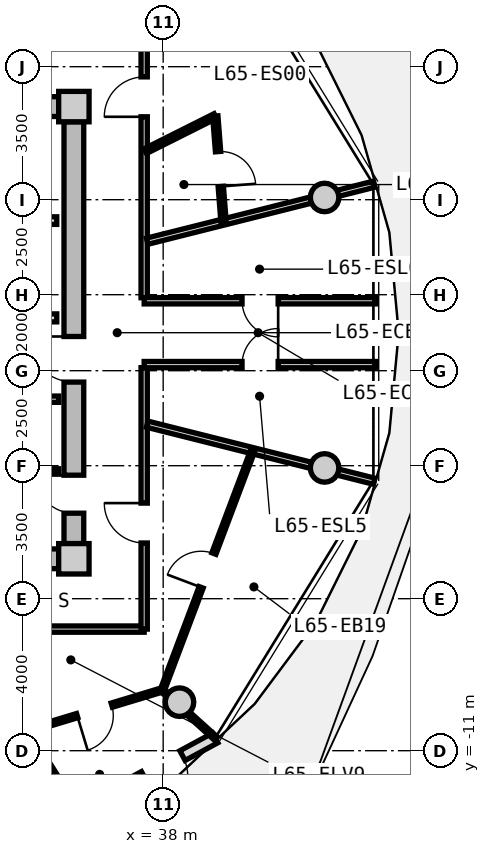
"""IFC4 building model, lengths in metres.
Left out: names, types, materials, properties, quantities, classifications, styles, units other than length and angle.
Written with IfcOpenShell. Run it as: python <this file> out.ifc"""

import sys

from ifc_helpers import new_model, si_unit, direction, frame, frame_2d, origin, origin_2d, place, context, subcontext, project, spatial, rectangle, circle, extrude, source, transform, mapped, element, fill, save


model = new_model("IFC4")
c1 = context("Model", 3, precision=1e-05, world=origin(), true_north=direction((0.0, 1.0)))
c2 = subcontext(c1, "Body", "Model", "MODEL_VIEW")
j1 = project(units=[si_unit("LENGTHUNIT", "METRE"), si_unit("PLANEANGLEUNIT", "RADIAN")], contexts=[c1])
p1 = place(None, origin())
s1 = spatial("IfcSite", under=j1, at=p1, CompositionType="ELEMENT")
p2 = place(p1, origin())
s2 = spatial("IfcBuilding", under=s1, at=p2, CompositionType="ELEMENT")
p3 = place(p2, frame((0.0, 0.0, 210.85)))
s3 = spatial("IfcBuildingStorey", under=s2, at=p3, CompositionType="ELEMENT", Elevation=210.85)
m1 = source(origin(), c2, "Body", "SweptSolid", [
    extrude(rectangle(XDim=0.8, YDim=0.8, at=origin_2d()), origin(), (0.0, 0.0, 1.0), 3.05),
])
for number, where, z_axis, x_axis in (
    (1, (35.65, -5.95, 0.0), (0.0, 0.0, 1.0), (1.0, 0.0, 0.0)),
    (2, (35.65, 5.95, 0.0), (0.0, 0.0, 1.0), (1.0, 0.0, 0.0)),
):
    element("IfcColumn", number, at=place(p3, frame(where, z_axis=z_axis, x_axis=x_axis)), inside=s3, PredefinedType="COLUMN", context=c2, shape_type="MappedRepresentation", body=[
        mapped(m1, transform((0.0, 0.0, 0.0), x_axis=(1.0, 0.0, 0.0), y_axis=(0.0, 1.0, 0.0), z_axis=(0.0, 0.0, 1.0), scale=1.0)),
    ])
m2 = source(origin(), c2, "Body", "SweptSolid", [
    extrude(rectangle(XDim=14.5, YDim=0.52, at=frame_2d((7.25, 0.0))), origin(), (0.0, 0.0, 1.0), 2.76),
])
for number, where, z_axis, x_axis in (
    (3, (20.75, 5.95, 0.0), (0.0, 0.0, 1.0), (1.0, 0.0, 0.0)),
    (4, (35.25, -5.95, 0.0), (0.0, 0.0, 1.0), (-1.0, 0.0, 0.0)),
):
    element("IfcWall", number, at=place(p3, frame(where, z_axis=z_axis, x_axis=x_axis)), inside=s3, PredefinedType="SHEAR", context=c2, shape_type="MappedRepresentation", body=[
        mapped(m2, transform((0.0, 0.0, 0.0), x_axis=(1.0, 0.0, 0.0), y_axis=(0.0, 1.0, 0.0), z_axis=(0.0, 0.0, 1.0), scale=1.0)),
    ])
m3 = source(origin(), c2, "Body", "SweptSolid", [
    extrude(rectangle(XDim=11.1, YDim=0.52, at=frame_2d((5.55, 0.0))), origin(), (0.0, 0.0, 1.0), 2.76),
])
p4 = place(p3, frame((35.65, 5.55, 0.0), z_axis=(0.0, 0.0, 1.0), x_axis=(0.0, -1.0, 0.0)))
e5 = element("IfcWall", 5, at=p4, inside=s3, PredefinedType="SHEAR", context=c2, shape_type="MappedRepresentation", body=[
    mapped(m3, transform((0.0, 0.0, 0.0), x_axis=(1.0, 0.0, 0.0), y_axis=(0.0, 1.0, 0.0), z_axis=(0.0, 0.0, 1.0), scale=1.0)),
])
p5 = place(p4, frame((5.65, 0.0, 0.0)))
e6 = element("IfcOpeningElement", 6, at=p5, cuts=e5, PredefinedType="OPENING", context=c2, shape_type="SweptSolid", body=[
    extrude(rectangle(XDim=1.2, YDim=2.15, at=frame_2d((0.6, 1.075))), frame((0.0, 0.27, 0.0), z_axis=(0.0, -1.0, 0.0), x_axis=(1.0, 0.0, 0.0)), (0.0, 0.0, 1.0), 0.54),
])
p6 = place(p4, frame((9.3, 0.0, 0.0)))
e7 = element("IfcOpeningElement", 7, at=p6, cuts=e5, PredefinedType="OPENING", context=c2, shape_type="SweptSolid", body=[
    extrude(rectangle(XDim=1.0, YDim=2.1, at=frame_2d((0.5, 1.05))), frame((0.0, 0.27, 0.0), z_axis=(0.0, -1.0, 0.0), x_axis=(1.0, 0.0, 0.0)), (0.0, 0.0, 1.0), 0.54),
])
m4 = source(origin(), c2, "Body", "SweptSolid", [
    extrude(circle(Radius=0.375, at=origin_2d()), origin(), (0.0, 0.0, 1.0), 3.05),
])
for number, where, z_axis, x_axis in (
    (8, (42.247, 3.559, 0.0), (0.0, 0.0, 1.0), (1.0, 0.0, 0.0)),
    (9, (38.43, -9.723, 0.0), (0.0, 0.0, 1.0), (1.0, 0.0, 0.0)),
    (10, (42.247, -3.559, 0.0), (0.0, 0.0, 1.0), (1.0, 0.0, 0.0)),
):
    element("IfcColumn", number, at=place(p3, frame(where, z_axis=z_axis, x_axis=x_axis)), inside=s3, PredefinedType="COLUMN", context=c2, shape_type="MappedRepresentation", body=[
        mapped(m4, transform((0.0, 0.0, 0.0), x_axis=(1.0, 0.0, 0.0), y_axis=(0.0, 1.0, 0.0), z_axis=(0.0, 0.0, 1.0), scale=1.0)),
    ])
m5 = source(origin(), c2, "Body", "SweptSolid", [
    extrude(rectangle(XDim=8.197, YDim=0.29, at=frame_2d((4.099, 0.0))), origin(), (0.0, 0.0, 1.0), 2.76),
])
p7 = place(p3, frame((39.37, -10.663, 0.0), z_axis=(0.0, 0.0, 1.0), x_axis=(-0.879369910001, -0.476139224791, 0.0)))
e11 = element("IfcWall", 11, at=p7, inside=s3, PredefinedType="SOLIDWALL", context=c2, shape_type="MappedRepresentation", body=[
    mapped(m5, transform((0.0, 0.0, 0.0), x_axis=(1.0, 0.0, 0.0), y_axis=(0.0, 1.0, 0.0), z_axis=(0.0, 0.0, 1.0), scale=1.0)),
])
p8 = place(p7, frame((0.98, 0.0, 0.0)))
e12 = element("IfcOpeningElement", 12, at=p8, cuts=e11, PredefinedType="OPENING", context=c2, shape_type="SweptSolid", body=[
    extrude(rectangle(XDim=1.15, YDim=2.25, at=frame_2d((0.575, 1.125))), frame((0.0, 0.155, 0.0), z_axis=(0.0, -1.0, 0.0), x_axis=(1.0, 0.0, 0.0)), (0.0, 0.0, 1.0), 0.31),
])
p9 = place(p7, frame((4.629, 0.0, 0.85)))
e13 = element("IfcOpeningElement", 13, at=p9, cuts=e11, PredefinedType="OPENING", context=c2, shape_type="SweptSolid", body=[
    extrude(rectangle(XDim=1.2, YDim=1.5, at=frame_2d((0.6, 0.75))), frame((0.0, 0.155, 0.0), z_axis=(0.0, -1.0, 0.0), x_axis=(1.0, 0.0, 0.0)), (0.0, 0.0, 1.0), 0.31),
])
m6 = source(origin(), c2, "Body", "SweptSolid", [
    extrude(rectangle(XDim=3.2, YDim=0.2, at=frame_2d((1.6, 0.0))), origin(), (0.0, 0.0, 1.0), 2.745),
])
p10 = place(p3, frame((32.0, 2.95, 0.0), z_axis=(0.0, 0.0, 1.0), x_axis=(1.0, 0.0, 0.0)))
e14 = element("IfcWall", 14, at=p10, inside=s3, PredefinedType="PARTITIONING", context=c2, shape_type="MappedRepresentation", body=[
    mapped(m6, transform((0.0, 0.0, 0.0), x_axis=(1.0, 0.0, 0.0), y_axis=(0.0, 1.0, 0.0), z_axis=(0.0, 0.0, 1.0), scale=1.0)),
])
m7 = source(origin(), c2, "Body", "SweptSolid", [
    extrude(rectangle(XDim=6.66, YDim=0.21, at=frame_2d((3.33, 0.0))), origin(), (0.0, 0.0, 1.0), 2.745),
])
p11 = place(p3, frame((28.54, 0.39, 0.0), z_axis=(0.0, 0.0, 1.0), x_axis=(1.0, 0.0, 0.0)))
e15 = element("IfcWall", 15, at=p11, inside=s3, PredefinedType="PARTITIONING", context=c2, shape_type="MappedRepresentation", body=[
    mapped(m7, transform((0.0, 0.0, 0.0), x_axis=(1.0, 0.0, 0.0), y_axis=(0.0, 1.0, 0.0), z_axis=(0.0, 0.0, 1.0), scale=1.0)),
])
p12 = place(p11, frame((1.0, 0.0, 0.0)))
e16 = element("IfcOpeningElement", 16, at=p12, cuts=e15, PredefinedType="OPENING", context=c2, shape_type="SweptSolid", body=[
    extrude(rectangle(XDim=1.2, YDim=2.15, at=frame_2d((0.6, 1.075))), frame((0.0, 0.115, 0.0), z_axis=(0.0, -1.0, 0.0), x_axis=(1.0, 0.0, 0.0)), (0.0, 0.0, 1.0), 0.23),
])
m8 = source(origin(), c2, "Body", "SweptSolid", [
    extrude(rectangle(XDim=2.7, YDim=0.165, at=frame_2d((1.35, 0.0))), origin(), (0.0, 0.0, 1.0), 2.745),
])
p13 = place(p3, frame((32.55, -1.75, 0.0), z_axis=(0.0, 0.0, 1.0), x_axis=(1.0, 0.0, 0.0)))
e17 = element("IfcWall", 17, at=p13, inside=s3, PredefinedType="PARTITIONING", context=c2, shape_type="MappedRepresentation", body=[
    mapped(m8, transform((0.0, 0.0, 0.0), x_axis=(1.0, 0.0, 0.0), y_axis=(0.0, 1.0, 0.0), z_axis=(0.0, 0.0, 1.0), scale=1.0)),
])
p14 = place(p13, frame((0.85, 0.0, 0.0)))
e18 = element("IfcOpeningElement", 18, at=p14, cuts=e17, PredefinedType="OPENING", context=c2, shape_type="SweptSolid", body=[
    extrude(rectangle(XDim=0.925, YDim=2.1, at=frame_2d((0.462, 1.05))), frame((0.0, 0.093, 0.0), z_axis=(0.0, -1.0, 0.0), x_axis=(1.0, 0.0, 0.0)), (0.0, 0.0, 1.0), 0.185),
])
m9 = source(origin(), c2, "Body", "SweptSolid", [
    extrude(rectangle(XDim=2.7, YDim=0.14, at=frame_2d((1.35, 0.0))), origin(), (0.0, 0.0, 1.0), 2.745),
])
p15 = place(p3, frame((32.55, -3.65, 0.0), z_axis=(0.0, 0.0, 1.0), x_axis=(1.0, 0.0, 0.0)))
e19 = element("IfcWall", 19, at=p15, inside=s3, PredefinedType="PARTITIONING", context=c2, shape_type="MappedRepresentation", body=[
    mapped(m9, transform((0.0, 0.0, 0.0), x_axis=(1.0, 0.0, 0.0), y_axis=(0.0, 1.0, 0.0), z_axis=(0.0, 0.0, 1.0), scale=1.0)),
])
m10 = source(origin(), c2, "Body", "SweptSolid", [
    extrude(rectangle(XDim=19.0, YDim=0.165, at=frame_2d((9.5, 0.0))), origin(), (0.0, 0.0, 1.0), 2.745),
])
p16 = place(p3, frame((37.5, -7.8, 0.0), z_axis=(0.0, 0.0, 1.0), x_axis=(-1.0, 0.0, 0.0)))
e20 = element("IfcWall", 20, at=p16, inside=s3, PredefinedType="PARTITIONING", context=c2, shape_type="MappedRepresentation", body=[
    mapped(m10, transform((0.0, 0.0, 0.0), x_axis=(1.0, 0.0, 0.0), y_axis=(0.0, 1.0, 0.0), z_axis=(0.0, 0.0, 1.0), scale=1.0)),
])
p17 = place(p16, frame((12.473, 0.0, 0.0)))
e21 = element("IfcOpeningElement", 21, at=p17, cuts=e20, PredefinedType="OPENING", context=c2, shape_type="SweptSolid", body=[
    extrude(rectangle(XDim=1.05, YDim=2.15, at=frame_2d((0.525, 1.075))), frame((0.0, 0.093, 0.0), z_axis=(0.0, -1.0, 0.0), x_axis=(1.0, 0.0, 0.0)), (0.0, 0.0, 1.0), 0.185),
])
m11 = source(origin(), c2, "Body", "SweptSolid", [
    extrude(rectangle(XDim=6.88, YDim=0.165, at=frame_2d((3.44, 0.0))), origin(), (0.0, 0.0, 1.0), 2.745),
])
p18 = place(p3, frame((37.5, 7.8, 0.0), z_axis=(0.0, 0.0, 1.0), x_axis=(0.0, -1.0, 0.0)))
e22 = element("IfcWall", 22, at=p18, inside=s3, PredefinedType="PARTITIONING", context=c2, shape_type="MappedRepresentation", body=[
    mapped(m11, transform((0.0, 0.0, 0.0), x_axis=(1.0, 0.0, 0.0), y_axis=(0.0, 1.0, 0.0), z_axis=(0.0, 0.0, 1.0), scale=1.0)),
])
p19 = place(p18, frame((1.068, 0.0, 0.0)))
e23 = element("IfcOpeningElement", 23, at=p19, cuts=e22, PredefinedType="OPENING", context=c2, shape_type="SweptSolid", body=[
    extrude(rectangle(XDim=1.05, YDim=2.15, at=frame_2d((0.525, 1.075))), frame((0.0, 0.093, 0.0), z_axis=(0.0, -1.0, 0.0), x_axis=(1.0, 0.0, 0.0)), (0.0, 0.0, 1.0), 0.185),
])
p20 = place(p3, frame((37.5, -0.92, 0.0), z_axis=(0.0, 0.0, 1.0), x_axis=(0.0, -1.0, 0.0)))
e24 = element("IfcWall", 24, at=p20, inside=s3, PredefinedType="PARTITIONING", context=c2, shape_type="MappedRepresentation", body=[
    mapped(m11, transform((0.0, 0.0, 0.0), x_axis=(1.0, 0.0, 0.0), y_axis=(0.0, 1.0, 0.0), z_axis=(0.0, 0.0, 1.0), scale=1.0)),
])
p21 = place(p20, frame((3.564, 0.0, 0.0)))
e25 = element("IfcOpeningElement", 25, at=p21, cuts=e24, PredefinedType="OPENING", context=c2, shape_type="SweptSolid", body=[
    extrude(rectangle(XDim=1.05, YDim=2.15, at=frame_2d((0.525, 1.075))), frame((0.0, 0.093, 0.0), z_axis=(0.0, -1.0, 0.0), x_axis=(1.0, 0.0, 0.0)), (0.0, 0.0, 1.0), 0.185),
])
m12 = source(origin(), c2, "Body", "SweptSolid", [
    extrude(rectangle(XDim=6.157, YDim=0.165, at=frame_2d((3.079, 0.0))), origin(), (0.0, 0.0, 1.0), 2.345),
])
for number, where, z_axis, x_axis in (
    (26, (37.58, -2.407, 0.0), (0.0, 0.0, 1.0), (0.97, -0.244, 0.0)),
    (27, (37.58, 2.407, 0.0), (0.0, 0.0, 1.0), (0.97, 0.244, 0.0)),
):
    element("IfcWall", number, at=place(p3, frame(where, z_axis=z_axis, x_axis=x_axis)), inside=s3, PredefinedType="PARTITIONING", context=c2, shape_type="MappedRepresentation", body=[
        mapped(m12, transform((0.0, 0.0, 0.0), x_axis=(1.0, 0.0, 0.0), y_axis=(0.0, 1.0, 0.0), z_axis=(0.0, 0.0, 1.0), scale=1.0)),
    ])
m13 = source(origin(), c2, "Body", "SweptSolid", [
    extrude(rectangle(XDim=6.101, YDim=0.165, at=frame_2d((3.051, 0.0))), origin(), (0.0, 0.0, 1.0), 2.745),
])
p22 = place(p3, frame((37.5, 0.84, 0.0), z_axis=(0.0, 0.0, 1.0), x_axis=(1.0, 0.0, 0.0)))
e28 = element("IfcWall", 28, at=p22, inside=s3, PredefinedType="PARTITIONING", context=c2, shape_type="MappedRepresentation", body=[
    mapped(m13, transform((0.0, 0.0, 0.0), x_axis=(1.0, 0.0, 0.0), y_axis=(0.0, 1.0, 0.0), z_axis=(0.0, 0.0, 1.0), scale=1.0)),
])
p23 = place(p22, frame((2.576, 0.0, 0.0)))
e29 = element("IfcOpeningElement", 29, at=p23, cuts=e28, PredefinedType="OPENING", context=c2, shape_type="SweptSolid", body=[
    extrude(rectangle(XDim=0.95, YDim=2.1, at=frame_2d((0.475, 1.05))), frame((0.0, 0.093, 0.0), z_axis=(0.0, -1.0, 0.0), x_axis=(1.0, 0.0, 0.0)), (0.0, 0.0, 1.0), 0.185),
])
p24 = place(p3, frame((43.601, -0.84, 0.0), z_axis=(0.0, 0.0, 1.0), x_axis=(-1.0, 0.0, 0.0)))
e30 = element("IfcWall", 30, at=p24, inside=s3, PredefinedType="PARTITIONING", context=c2, shape_type="MappedRepresentation", body=[
    mapped(m13, transform((0.0, 0.0, 0.0), x_axis=(1.0, 0.0, 0.0), y_axis=(0.0, 1.0, 0.0), z_axis=(0.0, 0.0, 1.0), scale=1.0)),
])
p25 = place(p24, frame((2.576, 0.0, 0.0)))
e31 = element("IfcOpeningElement", 31, at=p25, cuts=e30, PredefinedType="OPENING", context=c2, shape_type="SweptSolid", body=[
    extrude(rectangle(XDim=0.95, YDim=2.1, at=frame_2d((0.475, 1.05))), frame((0.0, 0.093, 0.0), z_axis=(0.0, -1.0, 0.0), x_axis=(1.0, 0.0, 0.0)), (0.0, 0.0, 1.0), 0.185),
])
m14 = source(origin(), c2, "Body", "SweptSolid", [
    extrude(rectangle(XDim=2.06, YDim=0.14, at=frame_2d((1.03, 0.0))), origin(), (0.0, 0.0, 1.0), 2.745),
])
p26 = place(p3, frame((37.53, 4.778, 0.0), z_axis=(0.0, 0.0, 1.0), x_axis=(0.893952568722, 0.448161583444, 0.0)))
e32 = element("IfcWall", 32, at=p26, inside=s3, PredefinedType="PARTITIONING", context=c2, shape_type="MappedRepresentation", body=[
    mapped(m14, transform((0.0, 0.0, 0.0), x_axis=(1.0, 0.0, 0.0), y_axis=(0.0, 1.0, 0.0), z_axis=(0.0, 0.0, 1.0), scale=1.0)),
])
m15 = source(origin(), c2, "Body", "SweptSolid", [
    extrude(rectangle(XDim=2.798, YDim=0.14, at=frame_2d((1.399, 0.0))), origin(), (0.0, 0.0, 1.0), 2.745),
])
p27 = place(p3, frame((39.371, 5.701, 0.0), z_axis=(0.0, 0.0, 1.0), x_axis=(0.077823984089, -0.996967114553, 0.0)))
e33 = element("IfcWall", 33, at=p27, inside=s3, PredefinedType="PARTITIONING", context=c2, shape_type="MappedRepresentation", body=[
    mapped(m15, transform((0.0, 0.0, 0.0), x_axis=(1.0, 0.0, 0.0), y_axis=(0.0, 1.0, 0.0), z_axis=(0.0, 0.0, 1.0), scale=1.0)),
])
p28 = place(p27, frame((0.939, 0.0, 0.0)))
e34 = element("IfcOpeningElement", 34, at=p28, cuts=e33, PredefinedType="OPENING", context=c2, shape_type="SweptSolid", body=[
    extrude(rectangle(XDim=0.92, YDim=2.1, at=frame_2d((0.46, 1.05))), frame((0.0, 0.08, 0.0), z_axis=(0.0, -1.0, 0.0), x_axis=(1.0, 0.0, 0.0)), (0.0, 0.0, 1.0), 0.16),
])
m16 = source(origin(), c2, "Body", "SweptSolid", [
    extrude(rectangle(XDim=6.738, YDim=0.115, at=frame_2d((3.369, 0.0))), origin(), (0.0, 0.0, 1.0), 2.745),
])
p29 = place(p3, frame((37.978, -9.409, 0.0), z_axis=(0.0, 0.0, 1.0), x_axis=(0.352945344347, 0.935643940772, 0.0)))
e35 = element("IfcWall", 35, at=p29, inside=s3, PredefinedType="PARTITIONING", context=c2, shape_type="MappedRepresentation", body=[
    mapped(m16, transform((0.0, 0.0, 0.0), x_axis=(1.0, 0.0, 0.0), y_axis=(0.0, 1.0, 0.0), z_axis=(0.0, 0.0, 1.0), scale=1.0)),
])
p30 = place(p29, frame((2.894, 0.0, 0.0)))
e36 = element("IfcOpeningElement", 36, at=p30, cuts=e35, PredefinedType="OPENING", context=c2, shape_type="SweptSolid", body=[
    extrude(rectangle(XDim=0.95, YDim=2.1, at=frame_2d((0.475, 1.05))), frame((0.0, 0.067, 0.0), z_axis=(0.0, -1.0, 0.0), x_axis=(1.0, 0.0, 0.0)), (0.0, 0.0, 1.0), 0.135),
])
m17 = source(origin(), c2, "Body", "SweptSolid", [
    extrude(rectangle(XDim=1.894, YDim=0.115, at=frame_2d((0.947, 0.0))), origin(), (0.0, 0.0, 1.0), 2.345),
])
p31 = place(p3, frame((37.978, -9.409, 0.0), z_axis=(0.0, 0.0, 1.0), x_axis=(0.742704207382, -0.669619638554, 0.0)))
e37 = element("IfcWall", 37, at=p31, inside=s3, PredefinedType="PARTITIONING", context=c2, shape_type="MappedRepresentation", body=[
    mapped(m17, transform((0.0, 0.0, 0.0), x_axis=(1.0, 0.0, 0.0), y_axis=(0.0, 1.0, 0.0), z_axis=(0.0, 0.0, 1.0), scale=1.0)),
])
m18 = source(origin(), c2, "Body", "SweptSolid", [
    extrude(rectangle(XDim=2.549, YDim=0.115, at=frame_2d((1.274, 0.0))), origin(), (0.0, 0.0, 1.0), 2.745),
])
p32 = place(p3, frame((34.414, -10.477, 0.0), z_axis=(0.0, 0.0, 1.0), x_axis=(0.534108310175, -0.845416059111, 0.0)))
e38 = element("IfcWall", 38, at=p32, inside=s3, PredefinedType="PARTITIONING", context=c2, shape_type="MappedRepresentation", body=[
    mapped(m18, transform((0.0, 0.0, 0.0), x_axis=(1.0, 0.0, 0.0), y_axis=(0.0, 1.0, 0.0), z_axis=(0.0, 0.0, 1.0), scale=1.0)),
])
m19 = source(origin(), c2, "Body", "SweptSolid", [
    extrude(rectangle(XDim=3.714, YDim=0.115, at=frame_2d((1.857, 0.0))), origin(), (0.0, 0.0, 1.0), 2.745),
])
p33 = place(p3, frame((34.414, -10.477, 0.0), z_axis=(0.0, 0.0, 1.0), x_axis=(0.957188983281, 0.28946372879, 0.0)))
e39 = element("IfcWall", 39, at=p33, inside=s3, PredefinedType="PARTITIONING", context=c2, shape_type="MappedRepresentation", body=[
    mapped(m19, transform((0.0, 0.0, 0.0), x_axis=(1.0, 0.0, 0.0), y_axis=(0.0, 1.0, 0.0), z_axis=(0.0, 0.0, 1.0), scale=1.0)),
])
p34 = place(p33, frame((1.382, 0.0, 0.0)))
e40 = element("IfcOpeningElement", 40, at=p34, cuts=e39, PredefinedType="OPENING", context=c2, shape_type="SweptSolid", body=[
    extrude(rectangle(XDim=0.95, YDim=2.1, at=frame_2d((0.475, 1.05))), frame((0.0, 0.067, 0.0), z_axis=(0.0, -1.0, 0.0), x_axis=(1.0, 0.0, 0.0)), (0.0, 0.0, 1.0), 0.135),
])
m20 = source(origin(), c2, "Body", "SweptSolid", [
    extrude(rectangle(XDim=1.15, YDim=2.25, at=frame_2d((0.575, 1.125))), frame((0.0, 0.025, 0.0), z_axis=(0.0, -1.0, 0.0), x_axis=(1.0, 0.0, 0.0)), (0.0, 0.0, 1.0), 0.05),
])
p35 = place(p8, origin())
e41 = element("IfcDoor", 41, at=p35, inside=s3, OperationType="SINGLE_SWING_RIGHT", PredefinedType="DOOR", context=c2, shape_type="MappedRepresentation", body=[
    mapped(m20, transform((0.0, 0.0, 0.0), x_axis=(1.0, 0.0, 0.0), y_axis=(0.0, 1.0, 0.0), z_axis=(0.0, 0.0, 1.0), scale=1.0)),
])
fill(e12, e41)
m21 = source(origin(), c2, "Body", "SweptSolid", [
    extrude(rectangle(XDim=1.2, YDim=2.15, at=frame_2d((0.6, 1.075))), frame((0.0, 0.025, 0.0), z_axis=(0.0, -1.0, 0.0), x_axis=(1.0, 0.0, 0.0)), (0.0, 0.0, 1.0), 0.05),
])
p36 = place(p5, frame((1.2, 0.0, 0.0), z_axis=(0.0, 0.0, 1.0), x_axis=(-1.0, 0.0, 0.0)))
e42 = element("IfcDoor", 42, at=p36, inside=s3, OperationType="SINGLE_SWING_RIGHT", PredefinedType="DOOR", context=c2, shape_type="MappedRepresentation", body=[
    mapped(m21, transform((0.0, 0.0, 0.0), x_axis=(1.0, 0.0, 0.0), y_axis=(0.0, 1.0, 0.0), z_axis=(0.0, 0.0, 1.0), scale=1.0)),
])
fill(e6, e42)
m22 = source(origin(), c2, "Body", "SweptSolid", [
    extrude(rectangle(XDim=1.0, YDim=2.1, at=frame_2d((0.5, 1.05))), frame((0.0, 0.025, 0.0), z_axis=(0.0, -1.0, 0.0), x_axis=(1.0, 0.0, 0.0)), (0.0, 0.0, 1.0), 0.05),
])
p37 = place(p6, frame((1.0, 0.0, 0.0), z_axis=(0.0, 0.0, 1.0), x_axis=(-1.0, 0.0, 0.0)))
e43 = element("IfcDoor", 43, at=p37, inside=s3, OperationType="SINGLE_SWING_RIGHT", PredefinedType="DOOR", context=c2, shape_type="MappedRepresentation", body=[
    mapped(m22, transform((0.0, 0.0, 0.0), x_axis=(1.0, 0.0, 0.0), y_axis=(0.0, 1.0, 0.0), z_axis=(0.0, 0.0, 1.0), scale=1.0)),
])
fill(e7, e43)
m23 = source(origin(), c2, "Body", "SweptSolid", [
    extrude(rectangle(XDim=0.95, YDim=2.1, at=frame_2d((0.475, 1.05))), frame((0.0, 0.025, 0.0), z_axis=(0.0, -1.0, 0.0), x_axis=(1.0, 0.0, 0.0)), (0.0, 0.0, 1.0), 0.05),
])
p38 = place(p25, frame((0.95, 0.0, 0.0), z_axis=(0.0, 0.0, 1.0), x_axis=(-1.0, 0.0, 0.0)))
e44 = element("IfcDoor", 44, at=p38, inside=s3, OperationType="SINGLE_SWING_RIGHT", PredefinedType="DOOR", context=c2, shape_type="MappedRepresentation", body=[
    mapped(m23, transform((0.0, 0.0, 0.0), x_axis=(1.0, 0.0, 0.0), y_axis=(0.0, 1.0, 0.0), z_axis=(0.0, 0.0, 1.0), scale=1.0)),
])
fill(e31, e44)
p39 = place(p23, frame((0.95, 0.0, 0.0), z_axis=(0.0, 0.0, 1.0), x_axis=(-1.0, 0.0, 0.0)))
e45 = element("IfcDoor", 45, at=p39, inside=s3, OperationType="SINGLE_SWING_LEFT", PredefinedType="DOOR", context=c2, shape_type="MappedRepresentation", body=[
    mapped(m23, transform((0.0, 0.0, 0.0), x_axis=(1.0, 0.0, 0.0), y_axis=(0.0, 1.0, 0.0), z_axis=(0.0, 0.0, 1.0), scale=1.0)),
])
fill(e29, e45)
m24 = source(origin(), c2, "Body", "SweptSolid", [
    extrude(rectangle(XDim=1.05, YDim=2.15, at=frame_2d((0.525, 1.075))), frame((0.0, 0.025, 0.0), z_axis=(0.0, -1.0, 0.0), x_axis=(1.0, 0.0, 0.0)), (0.0, 0.0, 1.0), 0.05),
])
p40 = place(p19, frame((1.05, 0.0, 0.0), z_axis=(0.0, 0.0, 1.0), x_axis=(-1.0, 0.0, 0.0)))
e46 = element("IfcDoor", 46, at=p40, inside=s3, OperationType="SINGLE_SWING_LEFT", PredefinedType="DOOR", context=c2, shape_type="MappedRepresentation", body=[
    mapped(m24, transform((0.0, 0.0, 0.0), x_axis=(1.0, 0.0, 0.0), y_axis=(0.0, 1.0, 0.0), z_axis=(0.0, 0.0, 1.0), scale=1.0)),
])
fill(e23, e46)
m25 = source(origin(), c2, "Body", "SweptSolid", [
    extrude(rectangle(XDim=0.92, YDim=2.1, at=frame_2d((0.46, 1.05))), frame((0.0, 0.025, 0.0), z_axis=(0.0, -1.0, 0.0), x_axis=(1.0, 0.0, 0.0)), (0.0, 0.0, 1.0), 0.05),
])
p41 = place(p28, origin())
e47 = element("IfcDoor", 47, at=p41, inside=s3, OperationType="SINGLE_SWING_RIGHT", PredefinedType="DOOR", context=c2, shape_type="MappedRepresentation", body=[
    mapped(m25, transform((0.0, 0.0, 0.0), x_axis=(1.0, 0.0, 0.0), y_axis=(0.0, 1.0, 0.0), z_axis=(0.0, 0.0, 1.0), scale=1.0)),
])
fill(e34, e47)
p42 = place(p21, frame((1.05, 0.0, 0.0), z_axis=(0.0, 0.0, 1.0), x_axis=(-1.0, 0.0, 0.0)))
e48 = element("IfcDoor", 48, at=p42, inside=s3, OperationType="SINGLE_SWING_RIGHT", PredefinedType="DOOR", context=c2, shape_type="MappedRepresentation", body=[
    mapped(m24, transform((0.0, 0.0, 0.0), x_axis=(1.0, 0.0, 0.0), y_axis=(0.0, 1.0, 0.0), z_axis=(0.0, 0.0, 1.0), scale=1.0)),
])
fill(e25, e48)
p43 = place(p34, frame((0.95, 0.0, 0.0), z_axis=(0.0, 0.0, 1.0), x_axis=(-1.0, 0.0, 0.0)))
e49 = element("IfcDoor", 49, at=p43, inside=s3, OperationType="SINGLE_SWING_RIGHT", PredefinedType="DOOR", context=c2, shape_type="MappedRepresentation", body=[
    mapped(m23, transform((0.0, 0.0, 0.0), x_axis=(1.0, 0.0, 0.0), y_axis=(0.0, 1.0, 0.0), z_axis=(0.0, 0.0, 1.0), scale=1.0)),
])
fill(e40, e49)
p44 = place(p30, origin())
e50 = element("IfcDoor", 50, at=p44, inside=s3, OperationType="SINGLE_SWING_LEFT", PredefinedType="DOOR", context=c2, shape_type="MappedRepresentation", body=[
    mapped(m23, transform((0.0, 0.0, 0.0), x_axis=(1.0, 0.0, 0.0), y_axis=(0.0, 1.0, 0.0), z_axis=(0.0, 0.0, 1.0), scale=1.0)),
])
fill(e36, e50)
save(model, sys.argv[1])
